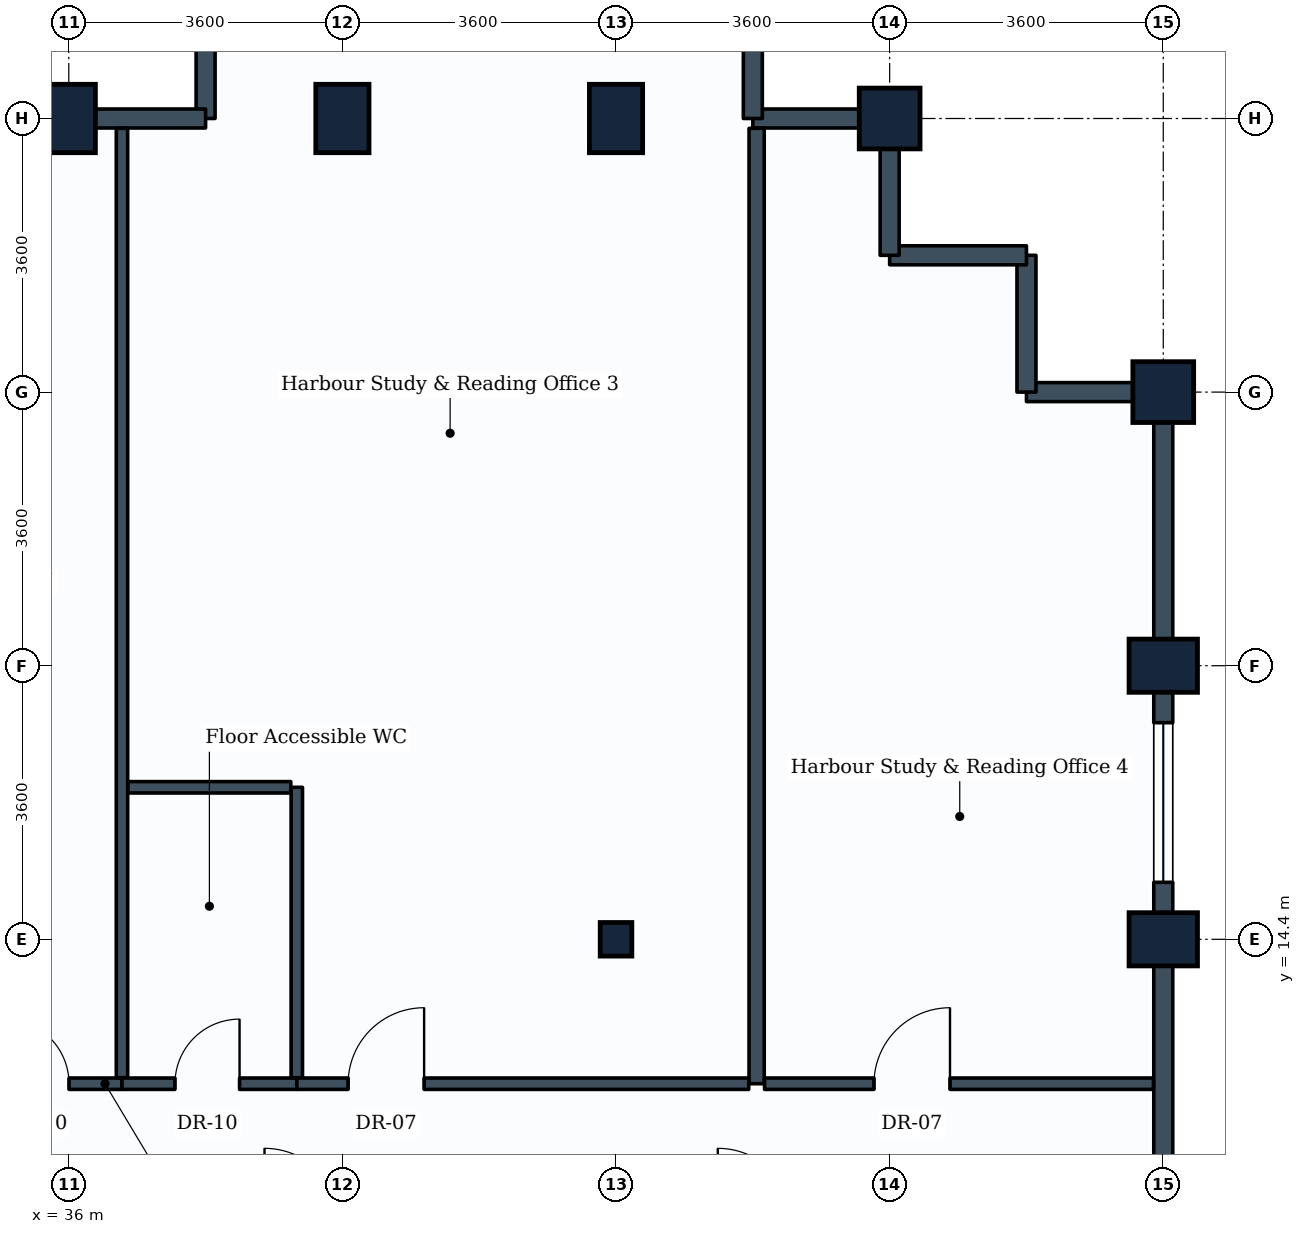
"""IFC4 building model, lengths in metres.
Left out: names, types, materials, properties, quantities, classifications, styles, units other than length and angle.
Written with IfcOpenShell. Run it as: python <this file> out.ifc"""

import sys

from ifc_helpers import new_model, si_unit, direction, frame, frame_2d, origin, origin_2d, place, context, subcontext, project, spatial, rectangle, i_section, extrude, element, fill, save


model = new_model("IFC4")
c1 = context("Model", 3, precision=1e-05, world=origin(), true_north=direction((0.0, 1.0)))
c2 = subcontext(c1, "Body", "Model", "MODEL_VIEW")
j1 = project(units=[si_unit("LENGTHUNIT", "METRE"), si_unit("PLANEANGLEUNIT", "RADIAN")], contexts=[c1])
p1 = place(None, origin())
s1 = spatial("IfcSite", under=j1, at=p1, CompositionType="ELEMENT")
p2 = place(p1, origin())
s2 = spatial("IfcBuilding", under=s1, at=p2, CompositionType="ELEMENT")
p3 = place(p2, frame((0.0, 0.0, 178.6)))
s3 = spatial("IfcBuildingStorey", under=s2, at=p3, CompositionType="ELEMENT", Elevation=178.6)
for number, where, z_axis, x_axis in (
    (1, (36.0, 25.2, 0.0), (0.0, 0.0, 1.0), (1.0, 0.0, 0.0)),
    (2, (39.6, 25.2, 0.0), (0.0, 0.0, 1.0), (1.0, 0.0, 0.0)),
):
    element("IfcColumn", number, at=place(p3, frame(where, z_axis=z_axis, x_axis=x_axis)), inside=s3, PredefinedType="COLUMN", context=c2, shape_type="SweptSolid", body=[
        extrude(rectangle(XDim=0.7, YDim=0.9, at=origin_2d()), origin(), (0.0, 0.0, 1.0), 3.8),
    ])
p4 = place(p3, frame((43.2, 14.4, 0.0), z_axis=(0.0, 0.0, 1.0), x_axis=(1.0, 0.0, 0.0)))
e3 = element("IfcColumn", 3, at=p4, inside=s3, PredefinedType="COLUMN", context=c2, shape_type="SweptSolid", body=[
    extrude(i_section(OverallWidth=0.416, OverallDepth=0.442, WebThickness=0.025, FlangeThickness=0.041, FilletRadius=0.015, at=origin_2d()), origin(), (0.0, 0.0, 1.0), 3.8),
])
p5 = place(p3, frame((43.2, 25.2, 0.0), z_axis=(0.0, 0.0, 1.0), x_axis=(1.0, 0.0, 0.0)))
e4 = element("IfcColumn", 4, at=p5, inside=s3, PredefinedType="COLUMN", context=c2, shape_type="SweptSolid", body=[
    extrude(rectangle(XDim=0.7, YDim=0.9, at=origin_2d()), origin(), (0.0, 0.0, 1.0), 3.8),
])
p6 = place(p3, frame((46.8, 25.2, 0.0), z_axis=(0.0, 0.0, 1.0), x_axis=(1.0, 0.0, 0.0)))
e5 = element("IfcColumn", 5, at=p6, inside=s3, PredefinedType="COLUMN", context=c2, shape_type="SweptSolid", body=[
    extrude(rectangle(XDim=0.8, YDim=0.8, at=origin_2d()), origin(), (0.0, 0.0, 1.0), 3.8),
])
for number, where, z_axis, x_axis in (
    (6, (50.4, 14.4, 0.0), (0.0, 0.0, 1.0), (0.0, 1.0, 0.0)),
    (7, (50.4, 18.0, 0.0), (0.0, 0.0, 1.0), (0.0, 1.0, 0.0)),
):
    element("IfcColumn", number, at=place(p3, frame(where, z_axis=z_axis, x_axis=x_axis)), inside=s3, PredefinedType="COLUMN", context=c2, shape_type="SweptSolid", body=[
        extrude(rectangle(XDim=0.7, YDim=0.9, at=origin_2d()), origin(), (0.0, 0.0, 1.0), 3.8),
    ])
p7 = place(p3, frame((50.4, 21.6, 0.0), z_axis=(0.0, 0.0, 1.0), x_axis=(0.0, 1.0, 0.0)))
e8 = element("IfcColumn", 8, at=p7, inside=s3, PredefinedType="COLUMN", context=c2, shape_type="SweptSolid", body=[
    extrude(rectangle(XDim=0.8, YDim=0.8, at=origin_2d()), origin(), (0.0, 0.0, 1.0), 3.8),
])
p8 = place(p3, frame((50.4, 14.4, 0.0), z_axis=(0.0, 0.0, 1.0), x_axis=(0.0, -1.0, 0.0)))
e9 = element("IfcWall", 9, at=p8, inside=s3, PredefinedType="STANDARD", context=c2, shape_type="SweptSolid", body=[
    extrude(rectangle(XDim=3.6, YDim=0.25, at=frame_2d((1.8, 0.0))), origin(), (0.0, 0.0, 1.0), 2.93),
])
p9 = place(p3, frame((50.4, 18.0, 0.0), z_axis=(0.0, 0.0, 1.0), x_axis=(0.0, -1.0, 0.0)))
e10 = element("IfcWall", 10, at=p9, inside=s3, PredefinedType="STANDARD", context=c2, shape_type="SweptSolid", body=[
    extrude(rectangle(XDim=3.6, YDim=0.25, at=frame_2d((1.8, 0.0))), origin(), (0.0, 0.0, 1.0), 2.93),
])
p10 = place(p9, frame((0.75, 0.0, 0.85)))
e11 = element("IfcOpeningElement", 11, at=p10, cuts=e10, PredefinedType="OPENING", context=c2, shape_type="SweptSolid", body=[
    extrude(rectangle(XDim=2.1, YDim=1.35, at=frame_2d((1.05, 0.675))), frame((0.0, 0.135, 0.0), z_axis=(0.0, -1.0, 0.0), x_axis=(1.0, 0.0, 0.0)), (0.0, 0.0, 1.0), 0.27),
])
p11 = place(p3, frame((50.4, 21.6, 0.0), z_axis=(0.0, 0.0, 1.0), x_axis=(0.0, -1.0, 0.0)))
e12 = element("IfcWall", 12, at=p11, inside=s3, PredefinedType="STANDARD", context=c2, shape_type="SweptSolid", body=[
    extrude(rectangle(XDim=3.6, YDim=0.25, at=frame_2d((1.8, 0.0))), origin(), (0.0, 0.0, 1.0), 2.93),
])
p12 = place(p3, frame((48.6, 21.6, 0.0), z_axis=(0.0, 0.0, 1.0), x_axis=(1.0, 0.0, 0.0)))
e13 = element("IfcWall", 13, at=p12, inside=s3, PredefinedType="STANDARD", context=c2, shape_type="SweptSolid", body=[
    extrude(rectangle(XDim=1.8, YDim=0.25, at=frame_2d((0.9, 0.0))), origin(), (0.0, 0.0, 1.0), 2.93),
])
p13 = place(p3, frame((48.6, 23.4, 0.0), z_axis=(0.0, 0.0, 1.0), x_axis=(0.0, -1.0, 0.0)))
e14 = element("IfcWall", 14, at=p13, inside=s3, PredefinedType="STANDARD", context=c2, shape_type="SweptSolid", body=[
    extrude(rectangle(XDim=1.8, YDim=0.25, at=frame_2d((0.9, 0.0))), origin(), (0.0, 0.0, 1.0), 3.535),
])
p14 = place(p3, frame((46.8, 23.4, 0.0), z_axis=(0.0, 0.0, 1.0), x_axis=(1.0, 0.0, 0.0)))
e15 = element("IfcWall", 15, at=p14, inside=s3, PredefinedType="STANDARD", context=c2, shape_type="SweptSolid", body=[
    extrude(rectangle(XDim=1.8, YDim=0.25, at=frame_2d((0.9, 0.0))), origin(), (0.0, 0.0, 1.0), 3.535),
])
for number, where, z_axis, x_axis in (
    (16, (46.8, 25.2, 0.0), (0.0, 0.0, 1.0), (0.0, -1.0, 0.0)),
    (17, (45.0, 25.2, 0.0), (0.0, 0.0, 1.0), (1.0, 0.0, 0.0)),
):
    element("IfcWall", number, at=place(p3, frame(where, z_axis=z_axis, x_axis=x_axis)), inside=s3, PredefinedType="STANDARD", context=c2, shape_type="SweptSolid", body=[
        extrude(rectangle(XDim=1.8, YDim=0.25, at=frame_2d((0.9, 0.0))), origin(), (0.0, 0.0, 1.0), 2.93),
    ])
for number, where, z_axis, x_axis in (
    (18, (45.0, 27.3, 0.0), (0.0, 0.0, 1.0), (0.0, -1.0, 0.0)),
    (19, (37.8, 27.3, 0.0), (0.0, 0.0, 1.0), (0.0, -1.0, 0.0)),
):
    element("IfcWall", number, at=place(p3, frame(where, z_axis=z_axis, x_axis=x_axis)), inside=s3, PredefinedType="STANDARD", context=c2, shape_type="SweptSolid", body=[
        extrude(rectangle(XDim=2.1, YDim=0.25, at=frame_2d((1.05, 0.0))), origin(), (0.0, 0.0, 1.0), 2.93),
    ])
p15 = place(p3, frame((36.0, 25.2, 0.0), z_axis=(0.0, 0.0, 1.0), x_axis=(1.0, 0.0, 0.0)))
e20 = element("IfcWall", 20, at=p15, inside=s3, PredefinedType="STANDARD", context=c2, shape_type="SweptSolid", body=[
    extrude(rectangle(XDim=1.8, YDim=0.25, at=frame_2d((0.9, 0.0))), origin(), (0.0, 0.0, 1.0), 2.93),
])
p16 = place(p3, frame((32.4, 25.2, 0.0), z_axis=(0.0, 0.0, 1.0), x_axis=(1.0, 0.0, 0.0)))
e21 = element("IfcWall", 21, at=p16, inside=s3, PredefinedType="STANDARD", context=c2, shape_type="SweptSolid", body=[
    extrude(rectangle(XDim=3.6, YDim=0.25, at=frame_2d((1.8, 0.0))), origin(), (0.0, 0.0, 1.0), 2.93),
])
p17 = place(p3, frame((34.479, 12.5, 0.0), z_axis=(0.0, 0.0, 1.0), x_axis=(1.0, 0.0, 0.0)))
e22 = element("IfcWall", 22, at=p17, inside=s3, PredefinedType="PARTITIONING", context=c2, shape_type="SweptSolid", body=[
    extrude(rectangle(XDim=2.221, YDim=0.15, at=frame_2d((1.11, 0.0))), origin(), (0.0, 0.0, 1.0), 3.22),
])
p18 = place(p17, frame((0.674, 0.0, 0.0)))
e23 = element("IfcOpeningElement", 23, at=p18, cuts=e22, PredefinedType="OPENING", context=c2, shape_type="SweptSolid", body=[
    extrude(rectangle(XDim=0.85, YDim=2.1, at=frame_2d((0.425, 1.05))), frame((0.0, 0.085, 0.0), z_axis=(0.0, -1.0, 0.0), x_axis=(1.0, 0.0, 0.0)), (0.0, 0.0, 1.0), 0.17),
])
p19 = place(p3, frame((36.7, 12.579, 0.0), z_axis=(0.0, 0.0, 1.0), x_axis=(0.0, 1.0, 0.0)))
e24 = element("IfcWall", 24, at=p19, inside=s3, PredefinedType="PARTITIONING", context=c2, shape_type="SweptSolid", body=[
    extrude(rectangle(XDim=12.492, YDim=0.15, at=frame_2d((6.246, 0.0))), origin(), (0.0, 0.0, 1.0), 2.93),
])
p20 = place(p3, frame((36.7, 12.5, 0.0), z_axis=(0.0, 0.0, 1.0), x_axis=(1.0, 0.0, 0.0)))
e25 = element("IfcWall", 25, at=p20, inside=s3, PredefinedType="PARTITIONING", context=c2, shape_type="SweptSolid", body=[
    extrude(rectangle(XDim=2.3, YDim=0.15, at=frame_2d((1.15, 0.0))), origin(), (0.0, 0.0, 1.0), 3.535),
])
p21 = place(p20, frame((0.697, 0.0, 0.0)))
e26 = element("IfcOpeningElement", 26, at=p21, cuts=e25, PredefinedType="OPENING", context=c2, shape_type="SweptSolid", body=[
    extrude(rectangle(XDim=0.85, YDim=2.1, at=frame_2d((0.425, 1.05))), frame((0.0, 0.085, 0.0), z_axis=(0.0, -1.0, 0.0), x_axis=(1.0, 0.0, 0.0)), (0.0, 0.0, 1.0), 0.17),
])
p22 = place(p3, frame((39.0, 12.579, 0.0), z_axis=(0.0, 0.0, 1.0), x_axis=(0.0, 1.0, 0.0)))
e27 = element("IfcWall", 27, at=p22, inside=s3, PredefinedType="PARTITIONING", context=c2, shape_type="SweptSolid", body=[
    extrude(rectangle(XDim=3.821, YDim=0.15, at=frame_2d((1.91, 0.0))), origin(), (0.0, 0.0, 1.0), 3.17),
])
p23 = place(p3, frame((36.779, 16.4, 0.0), z_axis=(0.0, 0.0, 1.0), x_axis=(1.0, 0.0, 0.0)))
e28 = element("IfcWall", 28, at=p23, inside=s3, PredefinedType="PARTITIONING", context=c2, shape_type="SweptSolid", body=[
    extrude(rectangle(XDim=2.142, YDim=0.15, at=frame_2d((1.071, 0.0))), origin(), (0.0, 0.0, 1.0), 3.535),
])
p24 = place(p3, frame((45.05, 12.5, 0.0), z_axis=(0.0, 0.0, 1.0), x_axis=(0.0, 1.0, 0.0)))
e29 = element("IfcWall", 29, at=p24, inside=s3, PredefinedType="PARTITIONING", context=c2, shape_type="SweptSolid", body=[
    extrude(rectangle(XDim=12.571, YDim=0.2, at=frame_2d((6.286, 0.0))), origin(), (0.0, 0.0, 1.0), 2.93),
])
p25 = place(p3, frame((39.0, 12.5, 0.0), z_axis=(0.0, 0.0, 1.0), x_axis=(1.0, 0.0, 0.0)))
e30 = element("IfcWall", 30, at=p25, inside=s3, PredefinedType="PARTITIONING", context=c2, shape_type="SweptSolid", body=[
    extrude(rectangle(XDim=5.946, YDim=0.15, at=frame_2d((2.973, 0.0))), origin(), (0.0, 0.0, 1.0), 3.17),
])
p26 = place(p25, frame((0.675, 0.0, 0.0)))
e31 = element("IfcOpeningElement", 31, at=p26, cuts=e30, PredefinedType="OPENING", context=c2, shape_type="SweptSolid", body=[
    extrude(rectangle(XDim=1.0, YDim=2.1, at=frame_2d((0.5, 1.05))), frame((0.0, 0.085, 0.0), z_axis=(0.0, -1.0, 0.0), x_axis=(1.0, 0.0, 0.0)), (0.0, 0.0, 1.0), 0.17),
])
p27 = place(p3, frame((45.154, 12.5, 0.0), z_axis=(0.0, 0.0, 1.0), x_axis=(1.0, 0.0, 0.0)))
e32 = element("IfcWall", 32, at=p27, inside=s3, PredefinedType="PARTITIONING", context=c2, shape_type="SweptSolid", body=[
    extrude(rectangle(XDim=5.117, YDim=0.15, at=frame_2d((2.559, 0.0))), origin(), (0.0, 0.0, 1.0), 2.93),
])
p28 = place(p27, frame((1.44, 0.0, 0.0)))
e33 = element("IfcOpeningElement", 33, at=p28, cuts=e32, PredefinedType="OPENING", context=c2, shape_type="SweptSolid", body=[
    extrude(rectangle(XDim=1.0, YDim=2.1, at=frame_2d((0.5, 1.05))), frame((0.0, 0.085, 0.0), z_axis=(0.0, -1.0, 0.0), x_axis=(1.0, 0.0, 0.0)), (0.0, 0.0, 1.0), 0.17),
])
p29 = place(p10, origin())
e34 = element("IfcWindow", 34, at=p29, inside=s3, PartitioningType="SINGLE_PANEL", PredefinedType="WINDOW", context=c2, shape_type="SweptSolid", body=[
    extrude(rectangle(XDim=2.1, YDim=1.35, at=frame_2d((1.05, 0.675))), frame((0.0, 0.03, 0.0), z_axis=(0.0, -1.0, 0.0), x_axis=(1.0, 0.0, 0.0)), (0.0, 0.0, 1.0), 0.06),
])
fill(e11, e34)
p30 = place(p18, origin())
e35 = element("IfcDoor", 35, at=p30, inside=s3, OperationType="SINGLE_SWING_LEFT", PredefinedType="DOOR", context=c2, shape_type="SweptSolid", body=[
    extrude(rectangle(XDim=0.85, YDim=2.1, at=frame_2d((0.425, 1.05))), frame((0.0, 0.025, 0.0), z_axis=(0.0, -1.0, 0.0), x_axis=(1.0, 0.0, 0.0)), (0.0, 0.0, 1.0), 0.05),
])
fill(e23, e35)
p31 = place(p21, origin())
e36 = element("IfcDoor", 36, at=p31, inside=s3, OperationType="SINGLE_SWING_RIGHT", PredefinedType="DOOR", context=c2, shape_type="SweptSolid", body=[
    extrude(rectangle(XDim=0.85, YDim=2.1, at=frame_2d((0.425, 1.05))), frame((0.0, 0.025, 0.0), z_axis=(0.0, -1.0, 0.0), x_axis=(1.0, 0.0, 0.0)), (0.0, 0.0, 1.0), 0.05),
])
fill(e26, e36)
p32 = place(p26, origin())
e37 = element("IfcDoor", 37, at=p32, inside=s3, OperationType="SINGLE_SWING_RIGHT", PredefinedType="DOOR", context=c2, shape_type="SweptSolid", body=[
    extrude(rectangle(XDim=1.0, YDim=2.1, at=frame_2d((0.5, 1.05))), frame((0.0, 0.025, 0.0), z_axis=(0.0, -1.0, 0.0), x_axis=(1.0, 0.0, 0.0)), (0.0, 0.0, 1.0), 0.05),
])
fill(e31, e37)
p33 = place(p28, origin())
e38 = element("IfcDoor", 38, at=p33, inside=s3, OperationType="SINGLE_SWING_RIGHT", PredefinedType="DOOR", context=c2, shape_type="SweptSolid", body=[
    extrude(rectangle(XDim=1.0, YDim=2.1, at=frame_2d((0.5, 1.05))), frame((0.0, 0.025, 0.0), z_axis=(0.0, -1.0, 0.0), x_axis=(1.0, 0.0, 0.0)), (0.0, 0.0, 1.0), 0.05),
])
fill(e33, e38)
save(model, sys.argv[1])
